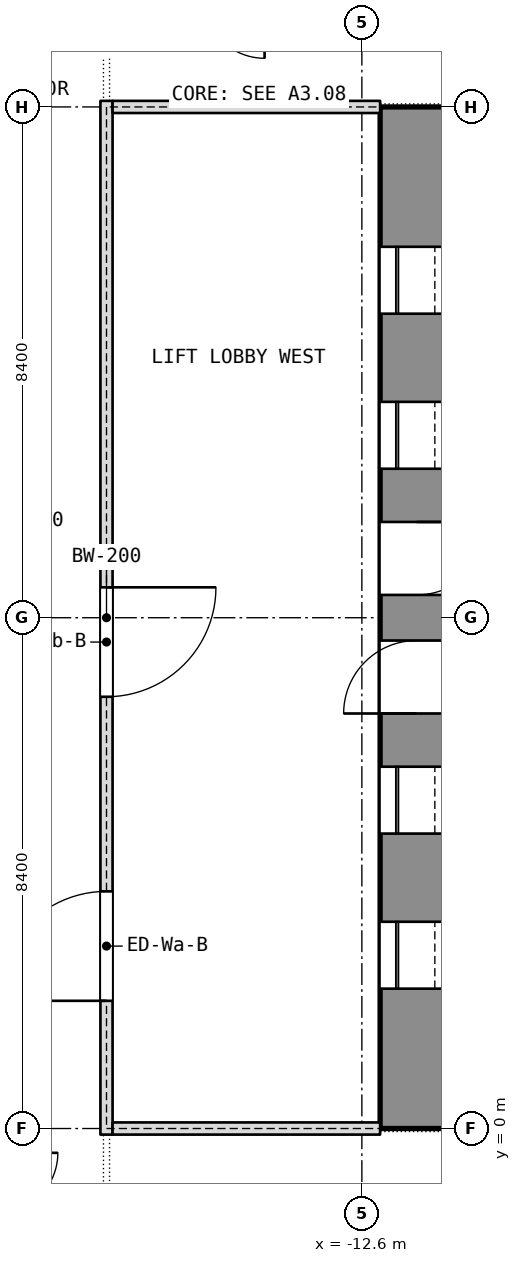
"""IFC4 building model, lengths in metres.
Left out: names, types, materials, properties, quantities, classifications, styles, units other than length and angle.
Written with IfcOpenShell. Run it as: python <this file> out.ifc"""

import sys

from ifc_helpers import new_model, si_unit, direction, frame, frame_2d, origin, place, context, subcontext, project, spatial, rectangle, extrude, element, fill, save


model = new_model("IFC4")
c1 = context("Model", 3, precision=1e-05, world=origin(), true_north=direction((0.0, 1.0)))
c2 = subcontext(c1, "Body", "Model", "MODEL_VIEW")
j1 = project(units=[si_unit("LENGTHUNIT", "METRE"), si_unit("PLANEANGLEUNIT", "RADIAN")], contexts=[c1])
p1 = place(None, origin())
s1 = spatial("IfcSite", under=j1, at=p1, CompositionType="ELEMENT")
p2 = place(p1, origin())
s2 = spatial("IfcBuilding", under=s1, at=p2, CompositionType="ELEMENT")
p3 = place(p2, frame((0.0, 0.0, 72.5)))
s3 = spatial("IfcBuildingStorey", under=s2, at=p3, CompositionType="ELEMENT", Elevation=72.5)
p4 = place(p3, frame((-11.7, 0.0, 0.0), z_axis=(0.0, 0.0, 1.0), x_axis=(0.0, 1.0, 0.0)))
e1 = element("IfcWall", 1, at=p4, inside=s3, PredefinedType="SHEAR", context=c2, shape_type="SweptSolid", body=[
    extrude(rectangle(XDim=16.8, YDim=1.2, at=frame_2d((8.4, 0.0))), origin(), (0.0, 0.0, 1.0), 3.6),
])
p5 = place(p4, frame((2.3, 0.0, 0.0)))
e2 = element("IfcOpeningElement", 2, at=p5, cuts=e1, PredefinedType="OPENING", context=c2, shape_type="SweptSolid", body=[
    extrude(rectangle(XDim=1.1, YDim=2.1, at=frame_2d((0.55, 1.05))), frame((0.0, 0.6, 0.0), z_axis=(0.0, -1.0, 0.0), x_axis=(1.0, 0.0, 0.0)), (0.0, 0.0, 1.0), 1.2),
])
p6 = place(p4, frame((4.85, 0.0, 0.0)))
e3 = element("IfcOpeningElement", 3, at=p6, cuts=e1, PredefinedType="OPENING", context=c2, shape_type="SweptSolid", body=[
    extrude(rectangle(XDim=1.1, YDim=2.1, at=frame_2d((0.55, 1.05))), frame((0.0, 0.6, 0.0), z_axis=(0.0, -1.0, 0.0), x_axis=(1.0, 0.0, 0.0)), (0.0, 0.0, 1.0), 1.2),
])
p7 = place(p4, frame((6.825, 0.0, 0.0)))
e4 = element("IfcOpeningElement", 4, at=p7, cuts=e1, PredefinedType="OPENING", context=c2, shape_type="SweptSolid", body=[
    extrude(rectangle(XDim=1.2, YDim=2.1, at=frame_2d((0.6, 1.05))), frame((0.0, 0.6, 0.0), z_axis=(0.0, -1.0, 0.0), x_axis=(1.0, 0.0, 0.0)), (0.0, 0.0, 1.0), 1.2),
])
p8 = place(p4, frame((13.4, 0.0, 0.0)))
e5 = element("IfcOpeningElement", 5, at=p8, cuts=e1, PredefinedType="OPENING", context=c2, shape_type="SweptSolid", body=[
    extrude(rectangle(XDim=1.1, YDim=2.1, at=frame_2d((0.55, 1.05))), frame((0.0, 0.6, 0.0), z_axis=(0.0, -1.0, 0.0), x_axis=(1.0, 0.0, 0.0)), (0.0, 0.0, 1.0), 1.2),
])
p9 = place(p4, frame((10.85, 0.0, 0.0)))
e6 = element("IfcOpeningElement", 6, at=p9, cuts=e1, PredefinedType="OPENING", context=c2, shape_type="SweptSolid", body=[
    extrude(rectangle(XDim=1.1, YDim=2.1, at=frame_2d((0.55, 1.05))), frame((0.0, 0.6, 0.0), z_axis=(0.0, -1.0, 0.0), x_axis=(1.0, 0.0, 0.0)), (0.0, 0.0, 1.0), 1.2),
])
p10 = place(p4, frame((8.775, 0.0, 0.0)))
e7 = element("IfcOpeningElement", 7, at=p10, cuts=e1, PredefinedType="OPENING", context=c2, shape_type="SweptSolid", body=[
    extrude(rectangle(XDim=1.2, YDim=2.1, at=frame_2d((0.6, 1.05))), frame((0.0, 0.6, 0.0), z_axis=(0.0, -1.0, 0.0), x_axis=(1.0, 0.0, 0.0)), (0.0, 0.0, 1.0), 1.2),
])
p11 = place(p3, frame((-16.8, -0.1, 0.0), z_axis=(0.0, 0.0, 1.0), x_axis=(0.0, 1.0, 0.0)))
e8 = element("IfcWall", 8, at=p11, inside=s3, PredefinedType="PARTITIONING", context=c2, shape_type="SweptSolid", body=[
    extrude(rectangle(XDim=17.0, YDim=0.2, at=frame_2d((8.5, 0.0))), origin(), (0.0, 0.0, 1.0), 3.34),
])
p12 = place(p11, frame((2.2, 0.0, 0.0)))
e9 = element("IfcOpeningElement", 9, at=p12, cuts=e8, PredefinedType="OPENING", context=c2, shape_type="SweptSolid", body=[
    extrude(rectangle(XDim=1.8, YDim=2.1, at=frame_2d((0.9, 1.05))), frame((0.0, 0.1, 0.0), z_axis=(0.0, -1.0, 0.0), x_axis=(1.0, 0.0, 0.0)), (0.0, 0.0, 1.0), 0.2),
])
p13 = place(p11, frame((7.2, 0.0, 0.0)))
e10 = element("IfcOpeningElement", 10, at=p13, cuts=e8, PredefinedType="OPENING", context=c2, shape_type="SweptSolid", body=[
    extrude(rectangle(XDim=1.8, YDim=2.1, at=frame_2d((0.9, 1.05))), frame((0.0, 0.1, 0.0), z_axis=(0.0, -1.0, 0.0), x_axis=(1.0, 0.0, 0.0)), (0.0, 0.0, 1.0), 0.2),
])
for number, where, z_axis, x_axis in (
    (11, (-16.7, 0.0, 0.0), (0.0, 0.0, 1.0), (1.0, 0.0, 0.0)),
    (12, (-16.7, 16.8, 0.0), (0.0, 0.0, 1.0), (1.0, 0.0, 0.0)),
):
    element("IfcWall", number, at=place(p3, frame(where, z_axis=z_axis, x_axis=x_axis)), inside=s3, PredefinedType="PARTITIONING", context=c2, shape_type="SweptSolid", body=[
        extrude(rectangle(XDim=4.4, YDim=0.2, at=frame_2d((2.2, 0.0))), origin(), (0.0, 0.0, 1.0), 2.84),
    ])
p14 = place(p5, origin())
e13 = element("IfcDoor", 13, at=p14, inside=s3, OperationType="SLIDING_TO_LEFT", PredefinedType="DOOR", context=c2, shape_type="SweptSolid", body=[
    extrude(rectangle(XDim=1.1, YDim=2.1, at=frame_2d((0.55, 1.05))), frame((0.0, 0.025, 0.0), z_axis=(0.0, -1.0, 0.0), x_axis=(1.0, 0.0, 0.0)), (0.0, 0.0, 1.0), 0.05),
])
fill(e2, e13)
p15 = place(p6, origin())
e14 = element("IfcDoor", 14, at=p15, inside=s3, OperationType="SLIDING_TO_LEFT", PredefinedType="DOOR", context=c2, shape_type="SweptSolid", body=[
    extrude(rectangle(XDim=1.1, YDim=2.1, at=frame_2d((0.55, 1.05))), frame((0.0, 0.025, 0.0), z_axis=(0.0, -1.0, 0.0), x_axis=(1.0, 0.0, 0.0)), (0.0, 0.0, 1.0), 0.05),
])
fill(e3, e14)
p16 = place(p7, origin())
e15 = element("IfcDoor", 15, at=p16, inside=s3, OperationType="SINGLE_SWING_LEFT", PredefinedType="DOOR", context=c2, shape_type="SweptSolid", body=[
    extrude(rectangle(XDim=1.2, YDim=2.1, at=frame_2d((0.6, 1.05))), frame((0.0, 0.025, 0.0), z_axis=(0.0, -1.0, 0.0), x_axis=(1.0, 0.0, 0.0)), (0.0, 0.0, 1.0), 0.05),
])
fill(e4, e15)
p17 = place(p8, origin())
e16 = element("IfcDoor", 16, at=p17, inside=s3, OperationType="SLIDING_TO_LEFT", PredefinedType="DOOR", context=c2, shape_type="SweptSolid", body=[
    extrude(rectangle(XDim=1.1, YDim=2.1, at=frame_2d((0.55, 1.05))), frame((0.0, 0.025, 0.0), z_axis=(0.0, -1.0, 0.0), x_axis=(1.0, 0.0, 0.0)), (0.0, 0.0, 1.0), 0.05),
])
fill(e5, e16)
p18 = place(p9, origin())
e17 = element("IfcDoor", 17, at=p18, inside=s3, OperationType="SLIDING_TO_LEFT", PredefinedType="DOOR", context=c2, shape_type="SweptSolid", body=[
    extrude(rectangle(XDim=1.1, YDim=2.1, at=frame_2d((0.55, 1.05))), frame((0.0, 0.025, 0.0), z_axis=(0.0, -1.0, 0.0), x_axis=(1.0, 0.0, 0.0)), (0.0, 0.0, 1.0), 0.05),
])
fill(e6, e17)
p19 = place(p10, origin())
e18 = element("IfcDoor", 18, at=p19, inside=s3, OperationType="SINGLE_SWING_LEFT", PredefinedType="DOOR", context=c2, shape_type="SweptSolid", body=[
    extrude(rectangle(XDim=1.2, YDim=2.1, at=frame_2d((0.6, 1.05))), frame((0.0, 0.025, 0.0), z_axis=(0.0, -1.0, 0.0), x_axis=(1.0, 0.0, 0.0)), (0.0, 0.0, 1.0), 0.05),
])
fill(e7, e18)
p20 = place(p12, origin())
e19 = element("IfcDoor", 19, at=p20, inside=s3, OperationType="DOUBLE_DOOR_SINGLE_SWING", PredefinedType="DOOR", context=c2, shape_type="SweptSolid", body=[
    extrude(rectangle(XDim=1.8, YDim=2.1, at=frame_2d((0.9, 1.05))), frame((0.0, 0.025, 0.0), z_axis=(0.0, -1.0, 0.0), x_axis=(1.0, 0.0, 0.0)), (0.0, 0.0, 1.0), 0.05),
])
fill(e9, e19)
p21 = place(p13, origin())
e20 = element("IfcDoor", 20, at=p21, inside=s3, OperationType="DOUBLE_DOOR_SINGLE_SWING", PredefinedType="DOOR", context=c2, shape_type="SweptSolid", body=[
    extrude(rectangle(XDim=1.8, YDim=2.1, at=frame_2d((0.9, 1.05))), frame((0.0, 0.025, 0.0), z_axis=(0.0, -1.0, 0.0), x_axis=(1.0, 0.0, 0.0)), (0.0, 0.0, 1.0), 0.05),
])
fill(e10, e20)
save(model, sys.argv[1])
